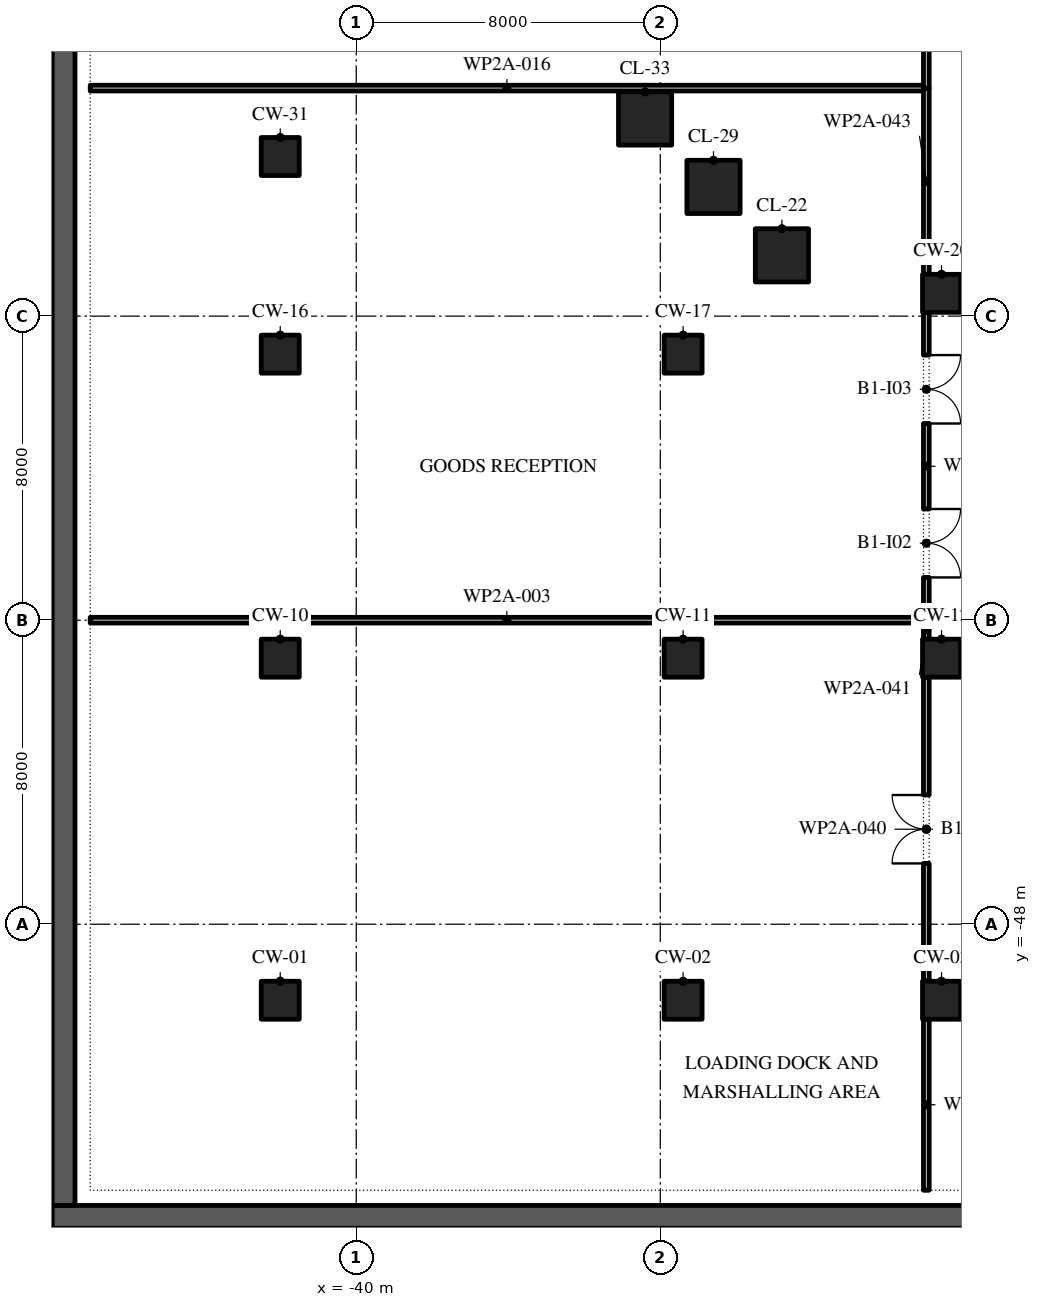
"""IFC4 building model, lengths in metres.
Left out: names, types, materials, properties, quantities, classifications, styles, units other than length and angle.
Written with IfcOpenShell. Run it as: python <this file> out.ifc"""

import sys

from ifc_helpers import new_model, si_unit, direction, frame, frame_2d, origin, origin_2d, place, context, subcontext, project, spatial, rectangle, extrude, element, fill, save


model = new_model("IFC4")
c1 = context("Model", 3, precision=1e-05, world=origin(), true_north=direction((0.0, 1.0)))
c2 = subcontext(c1, "Body", "Model", "MODEL_VIEW")
j1 = project(units=[si_unit("LENGTHUNIT", "METRE"), si_unit("PLANEANGLEUNIT", "RADIAN")], contexts=[c1])
p1 = place(None, origin())
s1 = spatial("IfcSite", under=j1, at=p1, CompositionType="ELEMENT")
p2 = place(p1, origin())
s2 = spatial("IfcBuilding", under=s1, at=p2, CompositionType="ELEMENT")
p3 = place(p2, frame((0.0, 0.0, -5.2)))
s3 = spatial("IfcBuildingStorey", under=s2, at=p3, CompositionType="ELEMENT", Elevation=-5.2)
p4 = place(p3, frame((-48.0, -55.7, 0.0), z_axis=(0.0, 0.0, 1.0), x_axis=(1.0, 0.0, 0.0)))
e1 = element("IfcWall", 1, at=p4, inside=s3, PredefinedType="SOLIDWALL", context=c2, shape_type="SweptSolid", body=[
    extrude(rectangle(XDim=96.0, YDim=0.6, at=frame_2d((48.0, 0.0))), origin(), (0.0, 0.0, 1.0), 4.8),
])
p5 = place(p3, frame((-47.7, -55.4, 0.0), z_axis=(0.0, 0.0, 1.0), x_axis=(0.0, 1.0, 0.0)))
e2 = element("IfcWall", 2, at=p5, inside=s3, PredefinedType="SOLIDWALL", context=c2, shape_type="SweptSolid", body=[
    extrude(rectangle(XDim=94.8, YDim=0.6, at=frame_2d((47.4, 0.0))), origin(), (0.0, 0.0, 1.0), 4.8),
])
for number, where, z_axis, x_axis in (
    (3, (-42.0, -50.0, 0.0), (0.0, 0.0, 1.0), (1.0, 0.0, 0.0)),
    (4, (-31.4, -50.0, 0.0), (0.0, 0.0, 1.0), (1.0, 0.0, 0.0)),
    (5, (-24.6, -50.0, 0.0), (0.0, 0.0, 1.0), (1.0, 0.0, 0.0)),
    (6, (-42.0, -41.0, 0.0), (0.0, 0.0, 1.0), (1.0, 0.0, 0.0)),
    (7, (-31.4, -41.0, 0.0), (0.0, 0.0, 1.0), (1.0, 0.0, 0.0)),
    (8, (-24.6, -41.0, 0.0), (0.0, 0.0, 1.0), (1.0, 0.0, 0.0)),
    (9, (-42.0, -33.0, 0.0), (0.0, 0.0, 1.0), (1.0, 0.0, 0.0)),
    (10, (-31.4, -33.0, 0.0), (0.0, 0.0, 1.0), (1.0, 0.0, 0.0)),
    (11, (-24.6, -31.4, 0.0), (0.0, 0.0, 1.0), (1.0, 0.0, 0.0)),
):
    element("IfcColumn", number, at=place(p3, frame(where, z_axis=z_axis, x_axis=x_axis)), inside=s3, PredefinedType="COLUMN", context=c2, shape_type="SweptSolid", body=[
        extrude(rectangle(XDim=1.0, YDim=1.0, at=origin_2d()), origin(), (0.0, 0.0, 1.0), 5.2),
    ])
for number, where, z_axis, x_axis in (
    (12, (-28.8, -30.4, 0.0), (0.0, 0.0, 1.0), (1.0, 0.0, 0.0)),
    (13, (-30.6, -28.6, 0.0), (0.0, 0.0, 1.0), (1.0, 0.0, 0.0)),
):
    element("IfcColumn", number, at=place(p3, frame(where, z_axis=z_axis, x_axis=x_axis)), inside=s3, PredefinedType="COLUMN", context=c2, shape_type="SweptSolid", body=[
        extrude(rectangle(XDim=1.4, YDim=1.4, at=origin_2d()), origin(), (0.0, 0.0, 1.0), 5.2),
    ])
p6 = place(p3, frame((-42.0, -27.8, 0.0), z_axis=(0.0, 0.0, 1.0), x_axis=(1.0, 0.0, 0.0)))
e14 = element("IfcColumn", 14, at=p6, inside=s3, PredefinedType="COLUMN", context=c2, shape_type="SweptSolid", body=[
    extrude(rectangle(XDim=1.0, YDim=1.0, at=origin_2d()), origin(), (0.0, 0.0, 1.0), 5.2),
])
p7 = place(p3, frame((-32.4, -26.8, 0.0), z_axis=(0.0, 0.0, 1.0), x_axis=(1.0, 0.0, 0.0)))
e15 = element("IfcColumn", 15, at=p7, inside=s3, PredefinedType="COLUMN", context=c2, shape_type="SweptSolid", body=[
    extrude(rectangle(XDim=1.4, YDim=1.4, at=origin_2d()), origin(), (0.0, 0.0, 1.0), 5.2),
])
for number, where, z_axis, x_axis in (
    (16, (-47.0, -40.0, 0.0), (0.0, 0.0, 1.0), (1.0, 0.0, 0.0)),
    (17, (-47.0, -26.0, 0.0), (0.0, 0.0, 1.0), (1.0, 0.0, 0.0)),
):
    element("IfcWall", number, at=place(p3, frame(where, z_axis=z_axis, x_axis=x_axis)), inside=s3, PredefinedType="PARTITIONING", context=c2, shape_type="SweptSolid", body=[
        extrude(rectangle(XDim=21.925, YDim=0.15, at=frame_2d((10.962, 0.0))), origin(), (0.0, 0.0, 1.0), 4.9),
    ])
p8 = place(p3, frame((-25.0, -55.0, 0.0), z_axis=(0.0, 0.0, 1.0), x_axis=(0.0, 1.0, 0.0)))
e18 = element("IfcWall", 18, at=p8, inside=s3, PredefinedType="PARTITIONING", context=c2, shape_type="SweptSolid", body=[
    extrude(rectangle(XDim=4.5, YDim=0.15, at=frame_2d((2.25, 0.0))), origin(), (0.0, 0.0, 1.0), 4.9),
])
p9 = place(p3, frame((-25.0, -49.5, 0.0), z_axis=(0.0, 0.0, 1.0), x_axis=(0.0, 1.0, 0.0)))
e19 = element("IfcWall", 19, at=p9, inside=s3, PredefinedType="PARTITIONING", context=c2, shape_type="SweptSolid", body=[
    extrude(rectangle(XDim=8.0, YDim=0.15, at=frame_2d((4.0, 0.0))), origin(), (0.0, 0.0, 1.0), 4.9),
])
p10 = place(p9, frame((3.1, 0.0, 0.0)))
e20 = element("IfcOpeningElement", 20, at=p10, cuts=e19, PredefinedType="OPENING", context=c2, shape_type="SweptSolid", body=[
    extrude(rectangle(XDim=1.8, YDim=2.1, at=frame_2d((0.9, 1.05))), frame((0.0, 0.085, 0.0), z_axis=(0.0, -1.0, 0.0), x_axis=(1.0, 0.0, 0.0)), (0.0, 0.0, 1.0), 0.17),
])
p11 = place(p3, frame((-25.0, -40.5, 0.0), z_axis=(0.0, 0.0, 1.0), x_axis=(0.0, 1.0, 0.0)))
e21 = element("IfcWall", 21, at=p11, inside=s3, PredefinedType="PARTITIONING", context=c2, shape_type="SweptSolid", body=[
    extrude(rectangle(XDim=0.5, YDim=0.15, at=frame_2d((0.25, 0.0))), origin(), (0.0, 0.0, 1.0), 4.9),
])
p12 = place(p3, frame((-25.0, -40.0, 0.0), z_axis=(0.0, 0.0, 1.0), x_axis=(0.0, 1.0, 0.0)))
e22 = element("IfcWall", 22, at=p12, inside=s3, PredefinedType="PARTITIONING", context=c2, shape_type="SweptSolid", body=[
    extrude(rectangle(XDim=8.1, YDim=0.15, at=frame_2d((4.05, 0.0))), origin(), (0.0, 0.0, 1.0), 4.9),
])
p13 = place(p12, frame((1.125, 0.0, 0.0)))
e23 = element("IfcOpeningElement", 23, at=p13, cuts=e22, PredefinedType="OPENING", context=c2, shape_type="SweptSolid", body=[
    extrude(rectangle(XDim=1.8, YDim=2.1, at=frame_2d((0.9, 1.05))), frame((0.0, 0.085, 0.0), z_axis=(0.0, -1.0, 0.0), x_axis=(1.0, 0.0, 0.0)), (0.0, 0.0, 1.0), 0.17),
])
p14 = place(p12, frame((5.175, 0.0, 0.0)))
e24 = element("IfcOpeningElement", 24, at=p14, cuts=e22, PredefinedType="OPENING", context=c2, shape_type="SweptSolid", body=[
    extrude(rectangle(XDim=1.8, YDim=2.1, at=frame_2d((0.9, 1.05))), frame((0.0, 0.085, 0.0), z_axis=(0.0, -1.0, 0.0), x_axis=(1.0, 0.0, 0.0)), (0.0, 0.0, 1.0), 0.17),
])
p15 = place(p3, frame((-25.0, -30.9, 0.0), z_axis=(0.0, 0.0, 1.0), x_axis=(0.0, 1.0, 0.0)))
e25 = element("IfcWall", 25, at=p15, inside=s3, PredefinedType="PARTITIONING", context=c2, shape_type="SweptSolid", body=[
    extrude(rectangle(XDim=4.9, YDim=0.15, at=frame_2d((2.45, 0.0))), origin(), (0.0, 0.0, 1.0), 4.9),
])
p16 = place(p3, frame((-25.0, -26.0, 0.0), z_axis=(0.0, 0.0, 1.0), x_axis=(0.0, 1.0, 0.0)))
e26 = element("IfcWall", 26, at=p16, inside=s3, PredefinedType="PARTITIONING", context=c2, shape_type="SweptSolid", body=[
    extrude(rectangle(XDim=14.0, YDim=0.15, at=frame_2d((7.0, 0.0))), origin(), (0.0, 0.0, 1.0), 4.9),
])
p17 = place(p16, frame((2.6, 0.0, 0.0)))
e27 = element("IfcOpeningElement", 27, at=p17, cuts=e26, PredefinedType="OPENING", context=c2, shape_type="SweptSolid", body=[
    extrude(rectangle(XDim=1.8, YDim=2.1, at=frame_2d((0.9, 1.05))), frame((0.0, 0.085, 0.0), z_axis=(0.0, -1.0, 0.0), x_axis=(1.0, 0.0, 0.0)), (0.0, 0.0, 1.0), 0.17),
])
p18 = place(p16, frame((9.6, 0.0, 0.0)))
e28 = element("IfcOpeningElement", 28, at=p18, cuts=e26, PredefinedType="OPENING", context=c2, shape_type="SweptSolid", body=[
    extrude(rectangle(XDim=1.8, YDim=2.1, at=frame_2d((0.9, 1.05))), frame((0.0, 0.085, 0.0), z_axis=(0.0, -1.0, 0.0), x_axis=(1.0, 0.0, 0.0)), (0.0, 0.0, 1.0), 0.17),
])
p19 = place(p10, origin())
e29 = element("IfcDoor", 29, at=p19, inside=s3, OperationType="SINGLE_SWING_LEFT", PredefinedType="DOOR", context=c2, shape_type="SweptSolid", body=[
    extrude(rectangle(XDim=1.8, YDim=2.1, at=frame_2d((0.9, 1.05))), frame((0.0, 0.025, 0.0), z_axis=(0.0, -1.0, 0.0), x_axis=(1.0, 0.0, 0.0)), (0.0, 0.0, 1.0), 0.05),
])
fill(e20, e29)
p20 = place(p13, frame((1.8, 0.0, 0.0), z_axis=(0.0, 0.0, 1.0), x_axis=(-1.0, 0.0, 0.0)))
e30 = element("IfcDoor", 30, at=p20, inside=s3, OperationType="SINGLE_SWING_RIGHT", PredefinedType="DOOR", context=c2, shape_type="SweptSolid", body=[
    extrude(rectangle(XDim=1.8, YDim=2.1, at=frame_2d((0.9, 1.05))), frame((0.0, 0.025, 0.0), z_axis=(0.0, -1.0, 0.0), x_axis=(1.0, 0.0, 0.0)), (0.0, 0.0, 1.0), 0.05),
])
fill(e23, e30)
p21 = place(p14, frame((1.8, 0.0, 0.0), z_axis=(0.0, 0.0, 1.0), x_axis=(-1.0, 0.0, 0.0)))
e31 = element("IfcDoor", 31, at=p21, inside=s3, OperationType="SINGLE_SWING_RIGHT", PredefinedType="DOOR", context=c2, shape_type="SweptSolid", body=[
    extrude(rectangle(XDim=1.8, YDim=2.1, at=frame_2d((0.9, 1.05))), frame((0.0, 0.025, 0.0), z_axis=(0.0, -1.0, 0.0), x_axis=(1.0, 0.0, 0.0)), (0.0, 0.0, 1.0), 0.05),
])
fill(e24, e31)
save(model, sys.argv[1])
